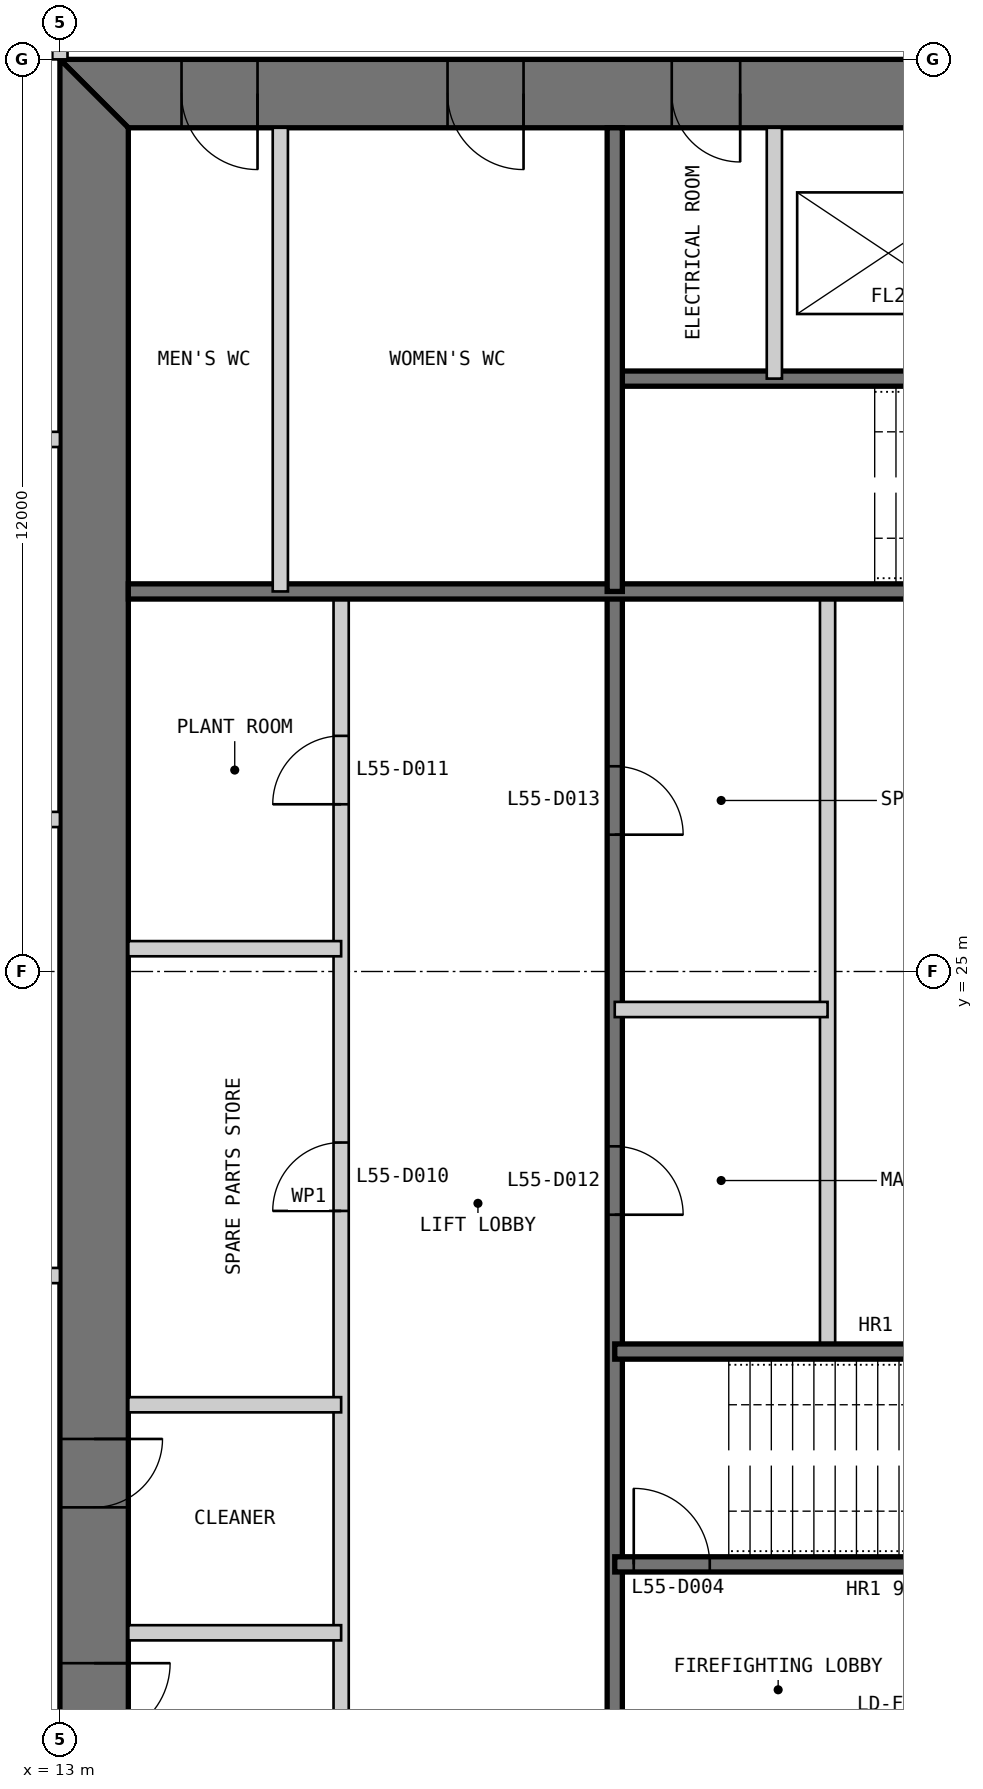
"""IFC4 building model, lengths in metres.
Left out: names, types, materials, properties, quantities, classifications, styles, units other than length and angle.
Written with IfcOpenShell. Run it as: python <this file> out.ifc"""

import sys

from ifc_helpers import new_model, si_unit, direction, frame, frame_2d, origin, place, context, subcontext, project, spatial, polyline, rectangle, outline, extrude, element, fill, save


model = new_model("IFC4")
c1 = context("Model", 3, precision=1e-05, world=origin(), true_north=direction((0.0, 1.0)))
c2 = subcontext(c1, "Body", "Model", "MODEL_VIEW")
j1 = project(units=[si_unit("LENGTHUNIT", "METRE"), si_unit("PLANEANGLEUNIT", "RADIAN")], contexts=[c1])
p1 = place(None, origin())
s1 = spatial("IfcSite", under=j1, at=p1, CompositionType="ELEMENT")
p2 = place(p1, origin())
s2 = spatial("IfcBuilding", under=s1, at=p2, CompositionType="ELEMENT")
p3 = place(p2, frame((0.0, 0.0, 233.8)))
s3 = spatial("IfcBuildingStorey", under=s2, at=p3, CompositionType="ELEMENT", Elevation=233.8)
p4 = place(p3, frame((37.0, 36.55, 0.0), z_axis=(0.0, 0.0, 1.0), x_axis=(-1.0, 0.0, 0.0)))
e1 = element("IfcWall", 1, at=p4, inside=s3, PredefinedType="SHEAR", context=c2, shape_type="SweptSolid", body=[
    extrude(outline(polyline([(0.0, -0.45), (24.0, -0.45), (23.1, 0.45), (0.9, 0.45), (0.0, -0.45)])), origin(), (0.0, 0.0, 1.0), 6.0),
])
p5 = place(p4, frame((4.9, 0.0, 0.0)))
e2 = element("IfcOpeningElement", 2, at=p5, cuts=e1, PredefinedType="OPENING", context=c2, shape_type="SweptSolid", body=[
    extrude(rectangle(XDim=1.0, YDim=2.2, at=frame_2d((0.5, 1.1))), frame((0.0, 0.46, 0.0), z_axis=(0.0, -1.0, 0.0), x_axis=(1.0, 0.0, 0.0)), (0.0, 0.0, 1.0), 0.92),
])
p6 = place(p4, frame((8.9, 0.0, 0.0)))
e3 = element("IfcOpeningElement", 3, at=p6, cuts=e1, PredefinedType="OPENING", context=c2, shape_type="SweptSolid", body=[
    extrude(rectangle(XDim=1.1, YDim=2.2, at=frame_2d((0.55, 1.1))), frame((0.0, 0.46, 0.0), z_axis=(0.0, -1.0, 0.0), x_axis=(1.0, 0.0, 0.0)), (0.0, 0.0, 1.0), 0.92),
])
p7 = place(p4, frame((15.05, 0.0, 0.0)))
e4 = element("IfcOpeningElement", 4, at=p7, cuts=e1, PredefinedType="OPENING", context=c2, shape_type="SweptSolid", body=[
    extrude(rectangle(XDim=0.9, YDim=2.2, at=frame_2d((0.45, 1.1))), frame((0.0, 0.46, 0.0), z_axis=(0.0, -1.0, 0.0), x_axis=(1.0, 0.0, 0.0)), (0.0, 0.0, 1.0), 0.92),
])
p8 = place(p4, frame((17.9, 0.0, 0.0)))
e5 = element("IfcOpeningElement", 5, at=p8, cuts=e1, PredefinedType="OPENING", context=c2, shape_type="SweptSolid", body=[
    extrude(rectangle(XDim=1.0, YDim=2.2, at=frame_2d((0.5, 1.1))), frame((0.0, 0.46, 0.0), z_axis=(0.0, -1.0, 0.0), x_axis=(1.0, 0.0, 0.0)), (0.0, 0.0, 1.0), 0.92),
])
p9 = place(p4, frame((21.4, 0.0, 0.0)))
e6 = element("IfcOpeningElement", 6, at=p9, cuts=e1, PredefinedType="OPENING", context=c2, shape_type="SweptSolid", body=[
    extrude(rectangle(XDim=1.0, YDim=2.2, at=frame_2d((0.5, 1.1))), frame((0.0, 0.46, 0.0), z_axis=(0.0, -1.0, 0.0), x_axis=(1.0, 0.0, 0.0)), (0.0, 0.0, 1.0), 0.92),
])
p10 = place(p3, frame((13.45, 36.1, 0.0), z_axis=(0.0, 0.0, 1.0), x_axis=(0.0, -1.0, 0.0)))
e7 = element("IfcWall", 7, at=p10, inside=s3, PredefinedType="SHEAR", context=c2, shape_type="SweptSolid", body=[
    extrude(outline(polyline([(-0.9, -0.45), (23.1, -0.45), (22.2, 0.45), (0.0, 0.45), (-0.9, -0.45)])), origin(), (0.0, 0.0, 1.0), 6.0),
])
p11 = place(p10, frame((20.2, 0.0, 0.0)))
e8 = element("IfcOpeningElement", 8, at=p11, cuts=e7, PredefinedType="OPENING", context=c2, shape_type="SweptSolid", body=[
    extrude(rectangle(XDim=1.0, YDim=2.2, at=frame_2d((0.5, 1.1))), frame((0.0, 0.46, 0.0), z_axis=(0.0, -1.0, 0.0), x_axis=(1.0, 0.0, 0.0)), (0.0, 0.0, 1.0), 0.92),
])
p12 = place(p10, frame((17.25, 0.0, 0.0)))
e9 = element("IfcOpeningElement", 9, at=p12, cuts=e7, PredefinedType="OPENING", context=c2, shape_type="SweptSolid", body=[
    extrude(rectangle(XDim=0.9, YDim=2.2, at=frame_2d((0.45, 1.1))), frame((0.0, 0.46, 0.0), z_axis=(0.0, -1.0, 0.0), x_axis=(1.0, 0.0, 0.0)), (0.0, 0.0, 1.0), 0.92),
])
p13 = place(p3, frame((16.7, 13.9, 0.0), z_axis=(0.0, 0.0, 1.0), x_axis=(0.0, 1.0, 0.0)))
e10 = element("IfcWall", 10, at=p13, inside=s3, PredefinedType="PARTITIONING", context=c2, shape_type="SweptSolid", body=[
    extrude(rectangle(XDim=16.1, YDim=0.2, at=frame_2d((8.05, 0.0))), origin(), (0.0, 0.0, 1.0), 5.8),
])
p14 = place(p13, frame((7.95, 0.0, 0.0)))
e11 = element("IfcOpeningElement", 11, at=p14, cuts=e10, PredefinedType="OPENING", context=c2, shape_type="SweptSolid", body=[
    extrude(rectangle(XDim=0.9, YDim=2.2, at=frame_2d((0.45, 1.1))), frame((0.0, 0.11, 0.0), z_axis=(0.0, -1.0, 0.0), x_axis=(1.0, 0.0, 0.0)), (0.0, 0.0, 1.0), 0.22),
])
p15 = place(p13, frame((13.3, 0.0, 0.0)))
e12 = element("IfcOpeningElement", 12, at=p15, cuts=e10, PredefinedType="OPENING", context=c2, shape_type="SweptSolid", body=[
    extrude(rectangle(XDim=0.9, YDim=2.2, at=frame_2d((0.45, 1.1))), frame((0.0, 0.11, 0.0), z_axis=(0.0, -1.0, 0.0), x_axis=(1.0, 0.0, 0.0)), (0.0, 0.0, 1.0), 0.22),
])
p16 = place(p3, frame((20.3, 13.9, 0.0), z_axis=(0.0, 0.0, 1.0), x_axis=(0.0, 1.0, 0.0)))
e13 = element("IfcWall", 13, at=p16, inside=s3, PredefinedType="SOLIDWALL", context=c2, shape_type="SweptSolid", body=[
    extrude(rectangle(XDim=16.1, YDim=0.2, at=frame_2d((8.05, 0.0))), origin(), (0.0, 0.0, 1.0), 5.8),
])
p17 = place(p16, frame((7.9, 0.0, 0.0)))
e14 = element("IfcOpeningElement", 14, at=p17, cuts=e13, PredefinedType="OPENING", context=c2, shape_type="SweptSolid", body=[
    extrude(rectangle(XDim=0.9, YDim=2.2, at=frame_2d((0.45, 1.1))), frame((0.0, 0.11, 0.0), z_axis=(0.0, -1.0, 0.0), x_axis=(1.0, 0.0, 0.0)), (0.0, 0.0, 1.0), 0.22),
])
p18 = place(p16, frame((12.9, 0.0, 0.0)))
e15 = element("IfcOpeningElement", 15, at=p18, cuts=e13, PredefinedType="OPENING", context=c2, shape_type="SweptSolid", body=[
    extrude(rectangle(XDim=0.9, YDim=2.2, at=frame_2d((0.45, 1.1))), frame((0.0, 0.11, 0.0), z_axis=(0.0, -1.0, 0.0), x_axis=(1.0, 0.0, 0.0)), (0.0, 0.0, 1.0), 0.22),
])
p19 = place(p3, frame((23.1, 20.0, 0.0), z_axis=(0.0, 0.0, 1.0), x_axis=(0.0, 1.0, 0.0)))
e16 = element("IfcWall", 16, at=p19, inside=s3, PredefinedType="PARTITIONING", context=c2, shape_type="SweptSolid", body=[
    extrude(rectangle(XDim=10.0, YDim=0.2, at=frame_2d((5.0, 0.0))), origin(), (0.0, 0.0, 1.0), 5.8),
])
p20 = place(p3, frame((20.3, 17.2, 0.0), z_axis=(0.0, 0.0, 1.0), x_axis=(1.0, 0.0, 0.0)))
e17 = element("IfcWall", 17, at=p20, inside=s3, PredefinedType="SOLIDWALL", context=c2, shape_type="SweptSolid", body=[
    extrude(rectangle(XDim=9.4, YDim=0.2, at=frame_2d((4.7, 0.0))), origin(), (0.0, 0.0, 1.0), 5.8),
])
p21 = place(p20, frame((0.25, 0.0, 0.0)))
e18 = element("IfcOpeningElement", 18, at=p21, cuts=e17, PredefinedType="OPENING", context=c2, shape_type="SweptSolid", body=[
    extrude(rectangle(XDim=1.0, YDim=2.2, at=frame_2d((0.5, 1.1))), frame((0.0, 0.11, 0.0), z_axis=(0.0, -1.0, 0.0), x_axis=(1.0, 0.0, 0.0)), (0.0, 0.0, 1.0), 0.22),
])
p22 = place(p3, frame((20.3, 20.0, 0.0), z_axis=(0.0, 0.0, 1.0), x_axis=(1.0, 0.0, 0.0)))
e19 = element("IfcWall", 19, at=p22, inside=s3, PredefinedType="SOLIDWALL", context=c2, shape_type="SweptSolid", body=[
    extrude(rectangle(XDim=15.8, YDim=0.2, at=frame_2d((7.9, 0.0))), origin(), (0.0, 0.0, 1.0), 5.8),
])
for number, where, z_axis, x_axis in (
    (20, (13.9, 16.3, 0.0), (0.0, 0.0, 1.0), (1.0, 0.0, 0.0)),
    (21, (13.9, 19.3, 0.0), (0.0, 0.0, 1.0), (1.0, 0.0, 0.0)),
    (22, (13.9, 25.3, 0.0), (0.0, 0.0, 1.0), (1.0, 0.0, 0.0)),
    (23, (20.3, 24.5, 0.0), (0.0, 0.0, 1.0), (1.0, 0.0, 0.0)),
):
    element("IfcWall", number, at=place(p3, frame(where, z_axis=z_axis, x_axis=x_axis)), inside=s3, PredefinedType="PARTITIONING", context=c2, shape_type="SweptSolid", body=[
        extrude(rectangle(XDim=2.8, YDim=0.2, at=frame_2d((1.4, 0.0))), origin(), (0.0, 0.0, 1.0), 5.8),
    ])
p23 = place(p3, frame((29.7, 32.8, 0.0), z_axis=(0.0, 0.0, 1.0), x_axis=(-1.0, 0.0, 0.0)))
e24 = element("IfcWall", 24, at=p23, inside=s3, PredefinedType="SOLIDWALL", context=c2, shape_type="SweptSolid", body=[
    extrude(rectangle(XDim=9.4, YDim=0.2, at=frame_2d((4.7, 0.0))), origin(), (0.0, 0.0, 1.0), 5.8),
])
p24 = place(p23, frame((0.25, 0.0, 0.0)))
e25 = element("IfcOpeningElement", 25, at=p24, cuts=e24, PredefinedType="OPENING", context=c2, shape_type="SweptSolid", body=[
    extrude(rectangle(XDim=1.0, YDim=2.2, at=frame_2d((0.5, 1.1))), frame((0.0, 0.11, 0.0), z_axis=(0.0, -1.0, 0.0), x_axis=(1.0, 0.0, 0.0)), (0.0, 0.0, 1.0), 0.22),
])
p25 = place(p3, frame((29.7, 30.0, 0.0), z_axis=(0.0, 0.0, 1.0), x_axis=(-1.0, 0.0, 0.0)))
e26 = element("IfcWall", 26, at=p25, inside=s3, PredefinedType="SOLIDWALL", context=c2, shape_type="SweptSolid", body=[
    extrude(rectangle(XDim=15.8, YDim=0.2, at=frame_2d((7.9, 0.0))), origin(), (0.0, 0.0, 1.0), 5.8),
])
p26 = place(p3, frame((22.4, 36.1, 0.0), z_axis=(0.0, 0.0, 1.0), x_axis=(0.0, -1.0, 0.0)))
e27 = element("IfcWall", 27, at=p26, inside=s3, PredefinedType="PARTITIONING", context=c2, shape_type="SweptSolid", body=[
    extrude(rectangle(XDim=3.3, YDim=0.2, at=frame_2d((1.65, 0.0))), origin(), (0.0, 0.0, 1.0), 5.8),
])
p27 = place(p3, frame((20.3, 36.1, 0.0), z_axis=(0.0, 0.0, 1.0), x_axis=(0.0, -1.0, 0.0)))
e28 = element("IfcWall", 28, at=p27, inside=s3, PredefinedType="SOLIDWALL", context=c2, shape_type="SweptSolid", body=[
    extrude(rectangle(XDim=6.1, YDim=0.2, at=frame_2d((3.05, 0.0))), origin(), (0.0, 0.0, 1.0), 5.8),
])
p28 = place(p3, frame((15.9, 36.1, 0.0), z_axis=(0.0, 0.0, 1.0), x_axis=(0.0, -1.0, 0.0)))
e29 = element("IfcWall", 29, at=p28, inside=s3, PredefinedType="PARTITIONING", context=c2, shape_type="SweptSolid", body=[
    extrude(rectangle(XDim=6.1, YDim=0.2, at=frame_2d((3.05, 0.0))), origin(), (0.0, 0.0, 1.0), 5.8),
])
p29 = place(p3, frame((13.0, 37.0, 0.0), z_axis=(0.0, 0.0, 1.0), x_axis=(0.0, 1.0, 0.0)))
e30 = element("IfcWall", 30, at=p29, inside=s3, PredefinedType="PARTITIONING", context=c2, shape_type="SweptSolid", body=[
    extrude(rectangle(XDim=5.5, YDim=0.2, at=frame_2d((2.75, 0.0))), origin(), (0.0, 0.0, 1.0), 4.705),
])
p30 = place(p3, frame((2.0, 21.0, 0.0), z_axis=(0.0, 0.0, 1.0), x_axis=(1.0, 0.0, 0.0)))
e31 = element("IfcWall", 31, at=p30, inside=s3, PredefinedType="PARTITIONING", context=c2, shape_type="SweptSolid", body=[
    extrude(rectangle(XDim=11.0, YDim=0.2, at=frame_2d((5.5, 0.0))), origin(), (0.0, 0.0, 1.0), 5.8),
])
p31 = place(p30, frame((4.6, 0.0, 0.0)))
e32 = element("IfcOpeningElement", 32, at=p31, cuts=e31, PredefinedType="OPENING", context=c2, shape_type="SweptSolid", body=[
    extrude(rectangle(XDim=1.8, YDim=2.4, at=frame_2d((0.9, 1.2))), frame((0.0, 0.11, 0.0), z_axis=(0.0, -1.0, 0.0), x_axis=(1.0, 0.0, 0.0)), (0.0, 0.0, 1.0), 0.22),
])
p32 = place(p3, frame((2.0, 27.0, 0.0), z_axis=(0.0, 0.0, 1.0), x_axis=(1.0, 0.0, 0.0)))
e33 = element("IfcWall", 33, at=p32, inside=s3, PredefinedType="PARTITIONING", context=c2, shape_type="SweptSolid", body=[
    extrude(rectangle(XDim=11.0, YDim=0.2, at=frame_2d((5.5, 0.0))), origin(), (0.0, 0.0, 1.0), 5.8),
])
p33 = place(p32, frame((4.6, 0.0, 0.0)))
e34 = element("IfcOpeningElement", 34, at=p33, cuts=e33, PredefinedType="OPENING", context=c2, shape_type="SweptSolid", body=[
    extrude(rectangle(XDim=1.8, YDim=2.4, at=frame_2d((0.9, 1.2))), frame((0.0, 0.11, 0.0), z_axis=(0.0, -1.0, 0.0), x_axis=(1.0, 0.0, 0.0)), (0.0, 0.0, 1.0), 0.22),
])
p34 = place(p3, frame((2.0, 32.0, 0.0), z_axis=(0.0, 0.0, 1.0), x_axis=(1.0, 0.0, 0.0)))
e35 = element("IfcWall", 35, at=p34, inside=s3, PredefinedType="PARTITIONING", context=c2, shape_type="SweptSolid", body=[
    extrude(rectangle(XDim=11.0, YDim=0.2, at=frame_2d((5.5, 0.0))), origin(), (0.0, 0.0, 1.0), 5.8),
])
p35 = place(p34, frame((4.6, 0.0, 0.0)))
e36 = element("IfcOpeningElement", 36, at=p35, cuts=e35, PredefinedType="OPENING", context=c2, shape_type="SweptSolid", body=[
    extrude(rectangle(XDim=1.8, YDim=2.4, at=frame_2d((0.9, 1.2))), frame((0.0, 0.11, 0.0), z_axis=(0.0, -1.0, 0.0), x_axis=(1.0, 0.0, 0.0)), (0.0, 0.0, 1.0), 0.22),
])
p36 = place(p21, origin())
e37 = element("IfcDoor", 37, at=p36, inside=s3, OperationType="SINGLE_SWING_LEFT", PredefinedType="DOOR", context=c2, shape_type="SweptSolid", body=[
    extrude(rectangle(XDim=1.0, YDim=2.2, at=frame_2d((0.5, 1.1))), frame((0.0, 0.025, 0.0), z_axis=(0.0, -1.0, 0.0), x_axis=(1.0, 0.0, 0.0)), (0.0, 0.0, 1.0), 0.05),
])
fill(e18, e37)
p37 = place(p11, origin())
e38 = element("IfcDoor", 38, at=p37, inside=s3, OperationType="SINGLE_SWING_LEFT", PredefinedType="DOOR", context=c2, shape_type="SweptSolid", body=[
    extrude(rectangle(XDim=1.0, YDim=2.2, at=frame_2d((0.5, 1.1))), frame((0.0, 0.025, 0.0), z_axis=(0.0, -1.0, 0.0), x_axis=(1.0, 0.0, 0.0)), (0.0, 0.0, 1.0), 0.05),
    extrude(outline(polyline([(0.0, 0.0), (0.04, 0.0), (0.04, 2.16), (0.96, 2.16), (0.96, 0.0), (1.0, 0.0), (1.0, 2.2), (0.0, 2.2), (0.0, 0.0)])), frame((0.0, 0.3, 0.0), z_axis=(0.0, -1.0, 0.0), x_axis=(1.0, 0.0, 0.0)), (0.0, 0.0, 1.0), 0.6),
])
fill(e8, e38)
p38 = place(p12, origin())
e39 = element("IfcDoor", 39, at=p38, inside=s3, OperationType="SINGLE_SWING_LEFT", PredefinedType="DOOR", context=c2, shape_type="SweptSolid", body=[
    extrude(rectangle(XDim=0.9, YDim=2.2, at=frame_2d((0.45, 1.1))), frame((0.0, 0.025, 0.0), z_axis=(0.0, -1.0, 0.0), x_axis=(1.0, 0.0, 0.0)), (0.0, 0.0, 1.0), 0.05),
    extrude(outline(polyline([(0.0, 0.0), (0.04, 0.0), (0.04, 2.16), (0.86, 2.16), (0.86, 0.0), (0.9, 0.0), (0.9, 2.2), (0.0, 2.2), (0.0, 0.0)])), frame((0.0, 0.3, 0.0), z_axis=(0.0, -1.0, 0.0), x_axis=(1.0, 0.0, 0.0)), (0.0, 0.0, 1.0), 0.6),
])
fill(e9, e39)
p39 = place(p14, origin())
e40 = element("IfcDoor", 40, at=p39, inside=s3, OperationType="SINGLE_SWING_LEFT", PredefinedType="DOOR", context=c2, shape_type="SweptSolid", body=[
    extrude(rectangle(XDim=0.9, YDim=2.2, at=frame_2d((0.45, 1.1))), frame((0.0, 0.025, 0.0), z_axis=(0.0, -1.0, 0.0), x_axis=(1.0, 0.0, 0.0)), (0.0, 0.0, 1.0), 0.05),
])
fill(e11, e40)
p40 = place(p15, origin())
e41 = element("IfcDoor", 41, at=p40, inside=s3, OperationType="SINGLE_SWING_LEFT", PredefinedType="DOOR", context=c2, shape_type="SweptSolid", body=[
    extrude(rectangle(XDim=0.9, YDim=2.2, at=frame_2d((0.45, 1.1))), frame((0.0, 0.025, 0.0), z_axis=(0.0, -1.0, 0.0), x_axis=(1.0, 0.0, 0.0)), (0.0, 0.0, 1.0), 0.05),
])
fill(e12, e41)
p41 = place(p17, frame((0.9, 0.0, 0.0), z_axis=(0.0, 0.0, 1.0), x_axis=(-1.0, 0.0, 0.0)))
e42 = element("IfcDoor", 42, at=p41, inside=s3, OperationType="SINGLE_SWING_RIGHT", PredefinedType="DOOR", context=c2, shape_type="SweptSolid", body=[
    extrude(rectangle(XDim=0.9, YDim=2.2, at=frame_2d((0.45, 1.1))), frame((0.0, 0.025, 0.0), z_axis=(0.0, -1.0, 0.0), x_axis=(1.0, 0.0, 0.0)), (0.0, 0.0, 1.0), 0.05),
])
fill(e14, e42)
p42 = place(p18, frame((0.9, 0.0, 0.0), z_axis=(0.0, 0.0, 1.0), x_axis=(-1.0, 0.0, 0.0)))
e43 = element("IfcDoor", 43, at=p42, inside=s3, OperationType="SINGLE_SWING_RIGHT", PredefinedType="DOOR", context=c2, shape_type="SweptSolid", body=[
    extrude(rectangle(XDim=0.9, YDim=2.2, at=frame_2d((0.45, 1.1))), frame((0.0, 0.025, 0.0), z_axis=(0.0, -1.0, 0.0), x_axis=(1.0, 0.0, 0.0)), (0.0, 0.0, 1.0), 0.05),
])
fill(e15, e43)
p43 = place(p7, origin())
e44 = element("IfcDoor", 44, at=p43, inside=s3, OperationType="SINGLE_SWING_LEFT", PredefinedType="DOOR", context=c2, shape_type="SweptSolid", body=[
    extrude(rectangle(XDim=0.9, YDim=2.2, at=frame_2d((0.45, 1.1))), frame((0.0, 0.025, 0.0), z_axis=(0.0, -1.0, 0.0), x_axis=(1.0, 0.0, 0.0)), (0.0, 0.0, 1.0), 0.05),
    extrude(outline(polyline([(0.0, 0.0), (0.04, 0.0), (0.04, 2.16), (0.86, 2.16), (0.86, 0.0), (0.9, 0.0), (0.9, 2.2), (0.0, 2.2), (0.0, 0.0)])), frame((0.0, 0.3, 0.0), z_axis=(0.0, -1.0, 0.0), x_axis=(1.0, 0.0, 0.0)), (0.0, 0.0, 1.0), 0.6),
])
fill(e4, e44)
p44 = place(p8, origin())
e45 = element("IfcDoor", 45, at=p44, inside=s3, OperationType="SINGLE_SWING_LEFT", PredefinedType="DOOR", context=c2, shape_type="SweptSolid", body=[
    extrude(rectangle(XDim=1.0, YDim=2.2, at=frame_2d((0.5, 1.1))), frame((0.0, 0.025, 0.0), z_axis=(0.0, -1.0, 0.0), x_axis=(1.0, 0.0, 0.0)), (0.0, 0.0, 1.0), 0.05),
    extrude(outline(polyline([(0.0, 0.0), (0.04, 0.0), (0.04, 2.16), (0.96, 2.16), (0.96, 0.0), (1.0, 0.0), (1.0, 2.2), (0.0, 2.2), (0.0, 0.0)])), frame((0.0, 0.3, 0.0), z_axis=(0.0, -1.0, 0.0), x_axis=(1.0, 0.0, 0.0)), (0.0, 0.0, 1.0), 0.6),
])
fill(e5, e45)
p45 = place(p9, origin())
e46 = element("IfcDoor", 46, at=p45, inside=s3, OperationType="SINGLE_SWING_LEFT", PredefinedType="DOOR", context=c2, shape_type="SweptSolid", body=[
    extrude(rectangle(XDim=1.0, YDim=2.2, at=frame_2d((0.5, 1.1))), frame((0.0, 0.025, 0.0), z_axis=(0.0, -1.0, 0.0), x_axis=(1.0, 0.0, 0.0)), (0.0, 0.0, 1.0), 0.05),
    extrude(outline(polyline([(0.0, 0.0), (0.04, 0.0), (0.04, 2.16), (0.96, 2.16), (0.96, 0.0), (1.0, 0.0), (1.0, 2.2), (0.0, 2.2), (0.0, 0.0)])), frame((0.0, 0.3, 0.0), z_axis=(0.0, -1.0, 0.0), x_axis=(1.0, 0.0, 0.0)), (0.0, 0.0, 1.0), 0.6),
])
fill(e6, e46)
save(model, sys.argv[1])
